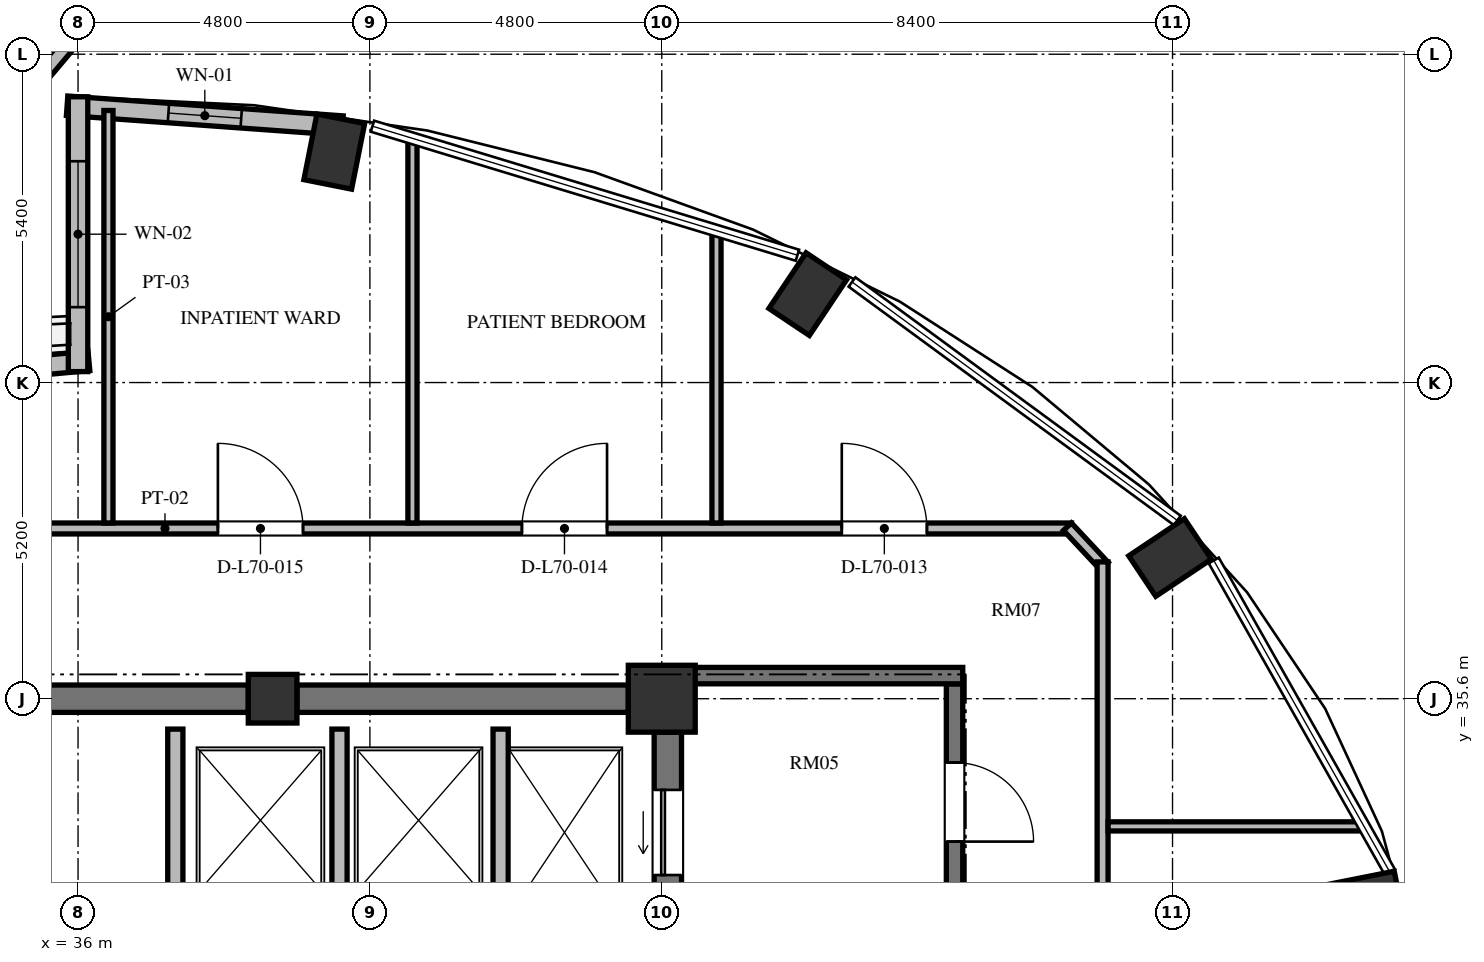
"""IFC4 building model, lengths in metres.
Left out: names, types, materials, properties, quantities, classifications, styles, units other than length and angle.
Written with IfcOpenShell. Run it as: python <this file> out.ifc"""

import sys

from ifc_helpers import new_model, si_unit, direction, frame, frame_2d, origin, origin_2d, place, context, subcontext, project, spatial, rectangle, extrude, element, fill, save


model = new_model("IFC4")
c1 = context("Model", 3, precision=1e-05, world=origin(), true_north=direction((0.0, 1.0)))
c2 = subcontext(c1, "Body", "Model", "MODEL_VIEW")
j1 = project(units=[si_unit("LENGTHUNIT", "METRE"), si_unit("PLANEANGLEUNIT", "RADIAN")], contexts=[c1])
p1 = place(None, origin())
s1 = spatial("IfcSite", under=j1, at=p1, CompositionType="ELEMENT")
p2 = place(p1, origin())
s2 = spatial("IfcBuilding", under=s1, at=p2, CompositionType="ELEMENT")
p3 = place(p2, frame((0.0, 0.0, 269.616)))
s3 = spatial("IfcBuildingStorey", under=s2, at=p3, CompositionType="ELEMENT", Elevation=269.616)
for number, where, z_axis, x_axis in (
    (1, (57.185, 32.263, 0.0), (0.0, 0.0, 1.0), (0.981, 0.195, 0.0)),
    (2, (53.96, 37.923, 0.0), (0.0, 0.0, 1.0), (0.831, 0.556, 0.0)),
    (3, (48.0, 42.254, 0.0), (0.0, 0.0, 1.0), (0.556, 0.831, 0.0)),
    (4, (40.214, 44.598, 0.0), (0.0, 0.0, 1.0), (0.195, 0.981, 0.0)),
):
    element("IfcColumn", number, at=place(p3, frame(where, z_axis=z_axis, x_axis=x_axis)), inside=s3, PredefinedType="COLUMN", context=c2, shape_type="SweptSolid", body=[
        extrude(rectangle(XDim=1.1, YDim=0.8, at=origin_2d()), origin(), (0.0, 0.0, 1.0), 3.648),
    ])
p4 = place(p3, frame((45.6, 35.6, 0.0), z_axis=(0.0, 0.0, 1.0), x_axis=(1.0, 0.0, 0.0)))
e5 = element("IfcColumn", 5, at=p4, inside=s3, PredefinedType="COLUMN", context=c2, shape_type="SweptSolid", body=[
    extrude(rectangle(XDim=1.1, YDim=1.1, at=origin_2d()), origin(), (0.0, 0.0, 1.0), 3.648),
])
p5 = place(p3, frame((39.2, 35.6, 0.0), z_axis=(0.0, 0.0, 1.0), x_axis=(1.0, 0.0, 0.0)))
e6 = element("IfcColumn", 6, at=p5, inside=s3, PredefinedType="COLUMN", context=c2, shape_type="SweptSolid", body=[
    extrude(rectangle(XDim=0.8, YDim=0.8, at=origin_2d()), origin(), (0.0, 0.0, 1.0), 3.648),
])
p6 = place(p3, frame((45.7, 20.95, 0.0), z_axis=(0.0, 0.0, 1.0), x_axis=(0.0, 1.0, 0.0)))
e7 = element("IfcWall", 7, at=p6, inside=s3, PredefinedType="SHEAR", context=c2, shape_type="SweptSolid", body=[
    extrude(rectangle(XDim=14.1, YDim=0.45, at=frame_2d((7.05, 0.0))), origin(), (0.0, 0.0, 1.0), 3.648),
])
p7 = place(p6, frame((11.75, 0.0, 0.0)))
e8 = element("IfcOpeningElement", 8, at=p7, cuts=e7, PredefinedType="OPENING", context=c2, shape_type="SweptSolid", body=[
    extrude(rectangle(XDim=1.4, YDim=2.3, at=frame_2d((0.7, 1.15))), frame((0.0, 0.235, 0.0), z_axis=(0.0, -1.0, 0.0), x_axis=(1.0, 0.0, 0.0)), (0.0, 0.0, 1.0), 0.47),
])
p8 = place(p6, frame((0.95, 0.0, 0.0)))
e9 = element("IfcOpeningElement", 9, at=p8, cuts=e7, PredefinedType="OPENING", context=c2, shape_type="SweptSolid", body=[
    extrude(rectangle(XDim=1.4, YDim=2.3, at=frame_2d((0.7, 1.15))), frame((0.0, 0.235, 0.0), z_axis=(0.0, -1.0, 0.0), x_axis=(1.0, 0.0, 0.0)), (0.0, 0.0, 1.0), 0.47),
])
p9 = place(p3, frame((33.2, 35.6, 0.0), z_axis=(0.0, 0.0, 1.0), x_axis=(1.0, 0.0, 0.0)))
e10 = element("IfcWall", 10, at=p9, inside=s3, PredefinedType="SHEAR", context=c2, shape_type="SweptSolid", body=[
    extrude(rectangle(XDim=5.6, YDim=0.45, at=frame_2d((2.8, 0.0))), origin(), (0.0, 0.0, 1.0), 3.648),
])
p10 = place(p3, frame((39.6, 35.6, 0.0), z_axis=(0.0, 0.0, 1.0), x_axis=(1.0, 0.0, 0.0)))
e11 = element("IfcWall", 11, at=p10, inside=s3, PredefinedType="SHEAR", context=c2, shape_type="SweptSolid", body=[
    extrude(rectangle(XDim=5.45, YDim=0.45, at=frame_2d((2.725, 0.0))), origin(), (0.0, 0.0, 1.0), 3.648),
])
p11 = place(p3, frame((40.35, 45.026, 0.0), z_axis=(0.0, 0.0, 1.0), x_axis=(-0.997412917451, 0.071885131294, 0.0)))
e12 = element("IfcWall", 12, at=p11, inside=s3, PredefinedType="SOLIDWALL", context=c2, shape_type="SweptSolid", body=[
    extrude(rectangle(XDim=4.541, YDim=0.32, at=frame_2d((2.271, 0.0))), origin(), (0.0, 0.0, 1.0), 3.448),
])
p12 = place(p11, frame((1.67, 0.0, 0.85)))
e13 = element("IfcOpeningElement", 13, at=p12, cuts=e12, PredefinedType="OPENING", context=c2, shape_type="SweptSolid", body=[
    extrude(rectangle(XDim=1.2, YDim=2.2, at=frame_2d((0.6, 1.1))), frame((0.0, 0.17, 0.0), z_axis=(0.0, -1.0, 0.0), x_axis=(1.0, 0.0, 0.0)), (0.0, 0.0, 1.0), 0.34),
])
p13 = place(p3, frame((36.179, 41.156, 0.0), z_axis=(0.0, 0.0, 1.0), x_axis=(-0.995736155144, -0.092247001792, 0.0)))
e14 = element("IfcWall", 14, at=p13, inside=s3, PredefinedType="SOLIDWALL", context=c2, shape_type="SweptSolid", body=[
    extrude(rectangle(XDim=3.216, YDim=0.32, at=frame_2d((1.608, 0.0))), origin(), (0.0, 0.0, 1.0), 3.448),
])
p14 = place(p13, frame((1.008, 0.0, 0.85)))
e15 = element("IfcOpeningElement", 15, at=p14, cuts=e14, PredefinedType="OPENING", context=c2, shape_type="SweptSolid", body=[
    extrude(rectangle(XDim=1.2, YDim=1.8, at=frame_2d((0.6, 0.9))), frame((0.0, 0.17, 0.0), z_axis=(0.0, -1.0, 0.0), x_axis=(1.0, 0.0, 0.0)), (0.0, 0.0, 1.0), 0.34),
])
p15 = place(p3, frame((36.0, 45.5, 0.0), z_axis=(0.0, 0.0, 1.0), x_axis=(0.0, -1.0, 0.0)))
e16 = element("IfcWall", 16, at=p15, inside=s3, PredefinedType="SOLIDWALL", context=c2, shape_type="SweptSolid", body=[
    extrude(rectangle(XDim=4.52, YDim=0.32, at=frame_2d((2.26, 0.0))), origin(), (0.0, 0.0, 1.0), 3.448),
])
p16 = place(p15, frame((1.06, 0.0, 0.84)))
e17 = element("IfcOpeningElement", 17, at=p16, cuts=e16, PredefinedType="OPENING", context=c2, shape_type="SweptSolid", body=[
    extrude(rectangle(XDim=2.4, YDim=2.04, at=frame_2d((1.2, 1.02))), frame((0.0, 0.17, 0.0), z_axis=(0.0, -1.0, 0.0), x_axis=(1.0, 0.0, 0.0)), (0.0, 0.0, 1.0), 0.34),
])
p17 = place(p3, frame((36.064, 46.636, 0.0), z_axis=(0.0, 0.0, 1.0), x_axis=(-0.644157596473, -0.764892797002, 0.0)))
e18 = element("IfcWall", 18, at=p17, inside=s3, PredefinedType="PARAPET", context=c2, shape_type="SweptSolid", body=[
    extrude(rectangle(XDim=6.881, YDim=0.24, at=frame_2d((3.441, 0.0))), origin(), (0.0, 0.0, 1.0), 1.2),
])
p18 = place(p3, frame((42.95, 31.92, 0.0), z_axis=(0.0, 0.0, 1.0), x_axis=(0.0, 1.0, 0.0)))
e19 = element("IfcWall", 19, at=p18, inside=s3, PredefinedType="SOLIDWALL", context=c2, shape_type="SweptSolid", body=[
    extrude(rectangle(XDim=3.18, YDim=0.25, at=frame_2d((1.59, 0.0))), origin(), (0.0, 0.0, 1.0), 3.448),
])
for number, where, z_axis, x_axis in (
    (20, (37.6, 32.42, 0.0), (0.0, 0.0, 1.0), (0.0, 1.0, 0.0)),
    (21, (40.3, 32.42, 0.0), (0.0, 0.0, 1.0), (0.0, 1.0, 0.0)),
):
    element("IfcWall", number, at=place(p3, frame(where, z_axis=z_axis, x_axis=x_axis)), inside=s3, PredefinedType="SOLIDWALL", context=c2, shape_type="SweptSolid", body=[
        extrude(rectangle(XDim=2.68, YDim=0.25, at=frame_2d((1.34, 0.0))), origin(), (0.0, 0.0, 1.0), 3.448),
    ])
p19 = place(p3, frame((50.415, 35.845, 0.0), z_axis=(0.0, 0.0, 1.0), x_axis=(0.0, -1.0, 0.0)))
e22 = element("IfcWall", 22, at=p19, inside=s3, PredefinedType="SHEAR", context=c2, shape_type="SweptSolid", body=[
    extrude(rectangle(XDim=15.825, YDim=0.27, at=frame_2d((7.913, 0.0))), origin(), (0.0, 0.0, 1.0), 3.648),
])
p20 = place(p19, frame((4.445, 0.0, 0.0)))
e23 = element("IfcOpeningElement", 23, at=p20, cuts=e22, PredefinedType="OPENING", context=c2, shape_type="SweptSolid", body=[
    extrude(rectangle(XDim=1.2, YDim=2.15, at=frame_2d((0.6, 1.075))), frame((0.0, 0.145, 0.0), z_axis=(0.0, -1.0, 0.0), x_axis=(1.0, 0.0, 0.0)), (0.0, 0.0, 1.0), 0.29),
])
p21 = place(p19, frame((1.295, 0.0, 0.0)))
e24 = element("IfcOpeningElement", 24, at=p21, cuts=e22, PredefinedType="OPENING", context=c2, shape_type="SweptSolid", body=[
    extrude(rectangle(XDim=1.3, YDim=2.2, at=frame_2d((0.65, 1.1))), frame((0.0, 0.145, 0.0), z_axis=(0.0, -1.0, 0.0), x_axis=(1.0, 0.0, 0.0)), (0.0, 0.0, 1.0), 0.29),
])
p22 = place(p19, frame((13.095, 0.0, 0.0)))
e25 = element("IfcOpeningElement", 25, at=p22, cuts=e22, PredefinedType="OPENING", context=c2, shape_type="SweptSolid", body=[
    extrude(rectangle(XDim=1.3, YDim=2.2, at=frame_2d((0.65, 1.1))), frame((0.0, 0.145, 0.0), z_axis=(0.0, -1.0, 0.0), x_axis=(1.0, 0.0, 0.0)), (0.0, 0.0, 1.0), 0.29),
])
p23 = place(p3, frame((45.925, 35.98, 0.0), z_axis=(0.0, 0.0, 1.0), x_axis=(1.0, 0.0, 0.0)))
e26 = element("IfcWall", 26, at=p23, inside=s3, PredefinedType="SHEAR", context=c2, shape_type="SweptSolid", body=[
    extrude(rectangle(XDim=4.625, YDim=0.27, at=frame_2d((2.312, 0.0))), origin(), (0.0, 0.0, 1.0), 3.648),
])
p24 = place(p3, frame((32.46, 38.4, 0.0), z_axis=(0.0, 0.0, 1.0), x_axis=(1.0, 0.0, 0.0)))
e27 = element("IfcWall", 27, at=p24, inside=s3, PredefinedType="PARTITIONING", context=c2, shape_type="SweptSolid", body=[
    extrude(rectangle(XDim=19.879, YDim=0.18, at=frame_2d((9.939, 0.0))), origin(), (0.0, 0.0, 1.0), 3.073),
])
p25 = place(p24, frame((16.101, 0.0, 0.0)))
e28 = element("IfcOpeningElement", 28, at=p25, cuts=e27, PredefinedType="OPENING", context=c2, shape_type="SweptSolid", body=[
    extrude(rectangle(XDim=1.4, YDim=2.2, at=frame_2d((0.7, 1.1))), frame((0.0, 0.1, 0.0), z_axis=(0.0, -1.0, 0.0), x_axis=(1.0, 0.0, 0.0)), (0.0, 0.0, 1.0), 0.2),
])
p26 = place(p24, frame((10.84, 0.0, 0.0)))
e29 = element("IfcOpeningElement", 29, at=p26, cuts=e27, PredefinedType="OPENING", context=c2, shape_type="SweptSolid", body=[
    extrude(rectangle(XDim=1.4, YDim=2.2, at=frame_2d((0.7, 1.1))), frame((0.0, 0.1, 0.0), z_axis=(0.0, -1.0, 0.0), x_axis=(1.0, 0.0, 0.0)), (0.0, 0.0, 1.0), 0.2),
])
p27 = place(p24, frame((5.84, 0.0, 0.0)))
e30 = element("IfcOpeningElement", 30, at=p27, cuts=e27, PredefinedType="OPENING", context=c2, shape_type="SweptSolid", body=[
    extrude(rectangle(XDim=1.4, YDim=2.2, at=frame_2d((0.7, 1.1))), frame((0.0, 0.1, 0.0), z_axis=(0.0, -1.0, 0.0), x_axis=(1.0, 0.0, 0.0)), (0.0, 0.0, 1.0), 0.2),
])
p28 = place(p24, frame((1.479, 0.0, 0.0)))
e31 = element("IfcOpeningElement", 31, at=p28, cuts=e27, PredefinedType="OPENING", context=c2, shape_type="SweptSolid", body=[
    extrude(rectangle(XDim=1.4, YDim=2.2, at=frame_2d((0.7, 1.1))), frame((0.0, 0.1, 0.0), z_axis=(0.0, -1.0, 0.0), x_axis=(1.0, 0.0, 0.0)), (0.0, 0.0, 1.0), 0.2),
])
p29 = place(p3, frame((52.272, 38.429, 0.0), z_axis=(0.0, 0.0, 1.0), x_axis=(0.682475113459, -0.730908831188, 0.0)))
e32 = element("IfcWall", 32, at=p29, inside=s3, PredefinedType="PARTITIONING", context=c2, shape_type="SweptSolid", body=[
    extrude(rectangle(XDim=0.887, YDim=0.18, at=frame_2d((0.444, 0.0))), origin(), (0.0, 0.0, 1.0), 3.448),
])
p30 = place(p3, frame((52.85, 37.85, 0.0), z_axis=(0.0, 0.0, 1.0), x_axis=(0.0, -1.0, 0.0)))
e33 = element("IfcWall", 33, at=p30, inside=s3, PredefinedType="PARTITIONING", context=c2, shape_type="SweptSolid", body=[
    extrude(rectangle(XDim=17.3, YDim=0.18, at=frame_2d((8.65, 0.0))), origin(), (0.0, 0.0, 1.0), 3.448),
])
p31 = place(p30, frame((12.575, 0.0, 0.0)))
e34 = element("IfcOpeningElement", 34, at=p31, cuts=e33, PredefinedType="OPENING", context=c2, shape_type="SweptSolid", body=[
    extrude(rectangle(XDim=1.05, YDim=2.15, at=frame_2d((0.525, 1.075))), frame((0.0, 0.1, 0.0), z_axis=(0.0, -1.0, 0.0), x_axis=(1.0, 0.0, 0.0)), (0.0, 0.0, 1.0), 0.2),
])
p32 = place(p30, frame((8.9, 0.0, 0.0)))
e35 = element("IfcOpeningElement", 35, at=p32, cuts=e33, PredefinedType="OPENING", context=c2, shape_type="SweptSolid", body=[
    extrude(rectangle(XDim=1.4, YDim=2.2, at=frame_2d((0.7, 1.1))), frame((0.0, 0.1, 0.0), z_axis=(0.0, -1.0, 0.0), x_axis=(1.0, 0.0, 0.0)), (0.0, 0.0, 1.0), 0.2),
])
p33 = place(p30, frame((5.4, 0.0, 0.0)))
e36 = element("IfcOpeningElement", 36, at=p33, cuts=e33, PredefinedType="OPENING", context=c2, shape_type="SweptSolid", body=[
    extrude(rectangle(XDim=1.4, YDim=2.2, at=frame_2d((0.7, 1.1))), frame((0.0, 0.1, 0.0), z_axis=(0.0, -1.0, 0.0), x_axis=(1.0, 0.0, 0.0)), (0.0, 0.0, 1.0), 0.2),
])
p34 = place(p3, frame((52.94, 33.5, 0.0), z_axis=(0.0, 0.0, 1.0), x_axis=(1.0, 0.0, 0.0)))
e37 = element("IfcWall", 37, at=p34, inside=s3, PredefinedType="PARTITIONING", context=c2, shape_type="SweptSolid", body=[
    extrude(rectangle(XDim=4.199, YDim=0.15, at=frame_2d((2.1, 0.0))), origin(), (0.0, 0.0, 1.0), 3.448),
])
p35 = place(p3, frame((36.5, 38.49, 0.0), z_axis=(0.0, 0.0, 1.0), x_axis=(0.0, 1.0, 0.0)))
e38 = element("IfcWall", 38, at=p35, inside=s3, PredefinedType="PARTITIONING", context=c2, shape_type="SweptSolid", body=[
    extrude(rectangle(XDim=6.785, YDim=0.15, at=frame_2d((3.392, 0.0))), origin(), (0.0, 0.0, 1.0), 3.448),
])
p36 = place(p3, frame((41.5, 38.49, 0.0), z_axis=(0.0, 0.0, 1.0), x_axis=(0.0, 1.0, 0.0)))
e39 = element("IfcWall", 39, at=p36, inside=s3, PredefinedType="PARTITIONING", context=c2, shape_type="SweptSolid", body=[
    extrude(rectangle(XDim=6.31, YDim=0.15, at=frame_2d((3.155, 0.0))), origin(), (0.0, 0.0, 1.0), 3.448),
])
p37 = place(p3, frame((46.5, 38.49, 0.0), z_axis=(0.0, 0.0, 1.0), x_axis=(0.0, 1.0, 0.0)))
e40 = element("IfcWall", 40, at=p37, inside=s3, PredefinedType="PARTITIONING", context=c2, shape_type="SweptSolid", body=[
    extrude(rectangle(XDim=4.791, YDim=0.15, at=frame_2d((2.396, 0.0))), origin(), (0.0, 0.0, 1.0), 3.448),
])
p38 = place(p12, origin())
e41 = element("IfcWindow", 41, at=p38, inside=s3, PartitioningType="SINGLE_PANEL", PredefinedType="WINDOW", context=c2, shape_type="SweptSolid", body=[
    extrude(rectangle(XDim=1.2, YDim=2.2, at=frame_2d((0.6, 1.1))), frame((0.0, 0.03, 0.0), z_axis=(0.0, -1.0, 0.0), x_axis=(1.0, 0.0, 0.0)), (0.0, 0.0, 1.0), 0.06),
])
fill(e13, e41)
p39 = place(p16, origin())
e42 = element("IfcWindow", 42, at=p39, inside=s3, PartitioningType="SINGLE_PANEL", PredefinedType="WINDOW", context=c2, shape_type="SweptSolid", body=[
    extrude(rectangle(XDim=2.4, YDim=2.04, at=frame_2d((1.2, 1.02))), frame((0.0, 0.03, 0.0), z_axis=(0.0, -1.0, 0.0), x_axis=(1.0, 0.0, 0.0)), (0.0, 0.0, 1.0), 0.06),
])
fill(e17, e42)
p40 = place(p7, origin())
e43 = element("IfcDoor", 43, at=p40, inside=s3, OperationType="SLIDING_TO_LEFT", PredefinedType="DOOR", context=c2, shape_type="SweptSolid", body=[
    extrude(rectangle(XDim=1.4, YDim=2.3, at=frame_2d((0.7, 1.15))), frame((0.0, 0.025, 0.0), z_axis=(0.0, -1.0, 0.0), x_axis=(1.0, 0.0, 0.0)), (0.0, 0.0, 1.0), 0.05),
])
fill(e8, e43)
p41 = place(p21, origin())
e44 = element("IfcDoor", 44, at=p41, inside=s3, OperationType="SINGLE_SWING_RIGHT", PredefinedType="DOOR", context=c2, shape_type="SweptSolid", body=[
    extrude(rectangle(XDim=1.3, YDim=2.2, at=frame_2d((0.65, 1.1))), frame((0.0, 0.025, 0.0), z_axis=(0.0, -1.0, 0.0), x_axis=(1.0, 0.0, 0.0)), (0.0, 0.0, 1.0), 0.05),
])
fill(e24, e44)
p42 = place(p25, origin())
e45 = element("IfcDoor", 45, at=p42, inside=s3, OperationType="SINGLE_SWING_LEFT", PredefinedType="DOOR", context=c2, shape_type="SweptSolid", body=[
    extrude(rectangle(XDim=1.4, YDim=2.2, at=frame_2d((0.7, 1.1))), frame((0.0, 0.025, 0.0), z_axis=(0.0, -1.0, 0.0), x_axis=(1.0, 0.0, 0.0)), (0.0, 0.0, 1.0), 0.05),
])
fill(e28, e45)
p43 = place(p26, origin())
e46 = element("IfcDoor", 46, at=p43, inside=s3, OperationType="SINGLE_SWING_RIGHT", PredefinedType="DOOR", context=c2, shape_type="SweptSolid", body=[
    extrude(rectangle(XDim=1.4, YDim=2.2, at=frame_2d((0.7, 1.1))), frame((0.0, 0.025, 0.0), z_axis=(0.0, -1.0, 0.0), x_axis=(1.0, 0.0, 0.0)), (0.0, 0.0, 1.0), 0.05),
])
fill(e29, e46)
p44 = place(p27, origin())
e47 = element("IfcDoor", 47, at=p44, inside=s3, OperationType="SINGLE_SWING_LEFT", PredefinedType="DOOR", context=c2, shape_type="SweptSolid", body=[
    extrude(rectangle(XDim=1.4, YDim=2.2, at=frame_2d((0.7, 1.1))), frame((0.0, 0.025, 0.0), z_axis=(0.0, -1.0, 0.0), x_axis=(1.0, 0.0, 0.0)), (0.0, 0.0, 1.0), 0.05),
])
fill(e30, e47)
save(model, sys.argv[1])
